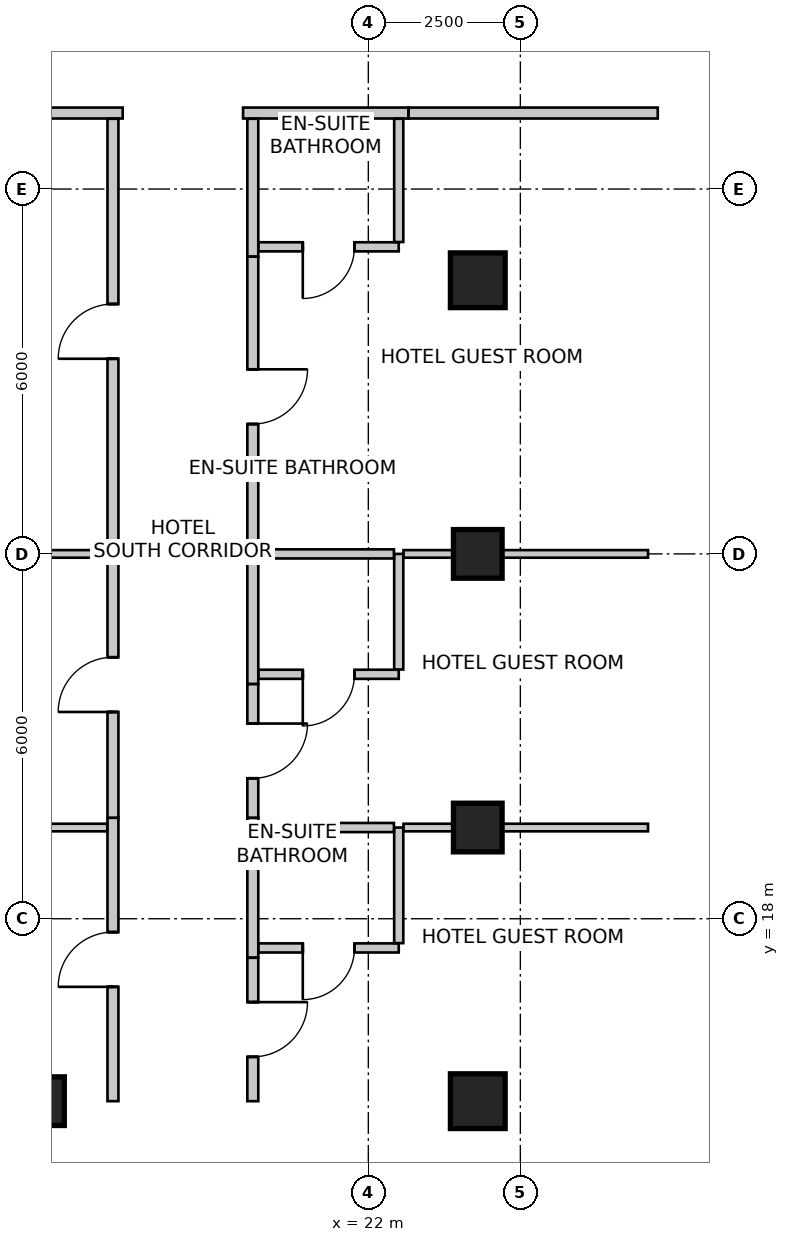
"""IFC4 building model, lengths in metres.
Left out: names, types, materials, properties, quantities, classifications, styles, units other than length and angle.
Written with IfcOpenShell. Run it as: python <this file> out.ifc"""

import sys

from ifc_helpers import new_model, si_unit, direction, frame, frame_2d, origin, origin_2d, place, context, subcontext, project, spatial, rectangle, extrude, source, transform, mapped, element, fill, save


model = new_model("IFC4")
c1 = context("Model", 3, precision=1e-05, world=origin(), true_north=direction((0.0, 1.0)))
c2 = subcontext(c1, "Body", "Model", "MODEL_VIEW")
j1 = project(units=[si_unit("LENGTHUNIT", "METRE"), si_unit("PLANEANGLEUNIT", "RADIAN")], contexts=[c1])
p1 = place(None, origin())
s1 = spatial("IfcSite", under=j1, at=p1, CompositionType="ELEMENT")
p2 = place(p1, origin())
s2 = spatial("IfcBuilding", under=s1, at=p2, CompositionType="ELEMENT")
p3 = place(p2, frame((0.0, 0.0, 125.0)))
s3 = spatial("IfcBuildingStorey", under=s2, at=p3, CompositionType="ELEMENT", Elevation=125.0)
m1 = source(origin(), c2, "Body", "SweptSolid", [
    extrude(rectangle(XDim=0.9, YDim=0.9, at=origin_2d()), origin(), (0.0, 0.0, 1.0), 3.6),
])
p4 = place(p3, frame((23.8, 28.5, 0.0), z_axis=(0.0, 0.0, 1.0), x_axis=(1.0, 0.0, 0.0)))
e1 = element("IfcColumn", 1, at=p4, inside=s3, PredefinedType="COLUMN", context=c2, shape_type="MappedRepresentation", body=[
    mapped(m1, transform((0.0, 0.0, 0.0), scale=1.0)),
])
m2 = source(origin(), c2, "Body", "SweptSolid", [
    extrude(rectangle(XDim=0.8, YDim=0.8, at=origin_2d()), origin(), (0.0, 0.0, 1.0), 3.6),
])
for number, where, z_axis, x_axis in (
    (2, (23.8, 24.0, 0.0), (0.0, 0.0, 1.0), (1.0, 0.0, 0.0)),
    (3, (23.8, 19.5, 0.0), (0.0, 0.0, 1.0), (1.0, 0.0, 0.0)),
):
    element("IfcColumn", number, at=place(p3, frame(where, z_axis=z_axis, x_axis=x_axis)), inside=s3, PredefinedType="COLUMN", context=c2, shape_type="MappedRepresentation", body=[
        mapped(m2, transform((0.0, 0.0, 0.0), scale=1.0)),
    ])
p5 = place(p3, frame((23.8, 15.0, 0.0), z_axis=(0.0, 0.0, 1.0), x_axis=(1.0, 0.0, 0.0)))
e4 = element("IfcColumn", 4, at=p5, inside=s3, PredefinedType="COLUMN", context=c2, shape_type="MappedRepresentation", body=[
    mapped(m1, transform((0.0, 0.0, 0.0), scale=1.0)),
])
p6 = place(p3, frame((16.6, 15.0, 0.0), z_axis=(0.0, 0.0, 1.0), x_axis=(1.0, 0.0, 0.0)))
e5 = element("IfcColumn", 5, at=p6, inside=s3, PredefinedType="COLUMN", context=c2, shape_type="MappedRepresentation", body=[
    mapped(m2, transform((0.0, 0.0, 0.0), scale=1.0)),
])
p7 = place(p3, frame((17.96, 31.25, 0.0), z_axis=(0.0, 0.0, 1.0), x_axis=(-1.0, 0.0, 0.0)))
e6 = element("IfcWall", 6, at=p7, inside=s3, PredefinedType="PARTITIONING", context=c2, shape_type="SweptSolid", body=[
    extrude(rectangle(XDim=5.366, YDim=0.18, at=frame_2d((2.683, 0.0))), origin(), (0.0, 0.0, 1.0), 2.935),
])
p8 = place(p3, frame((22.66, 31.25, 0.0), z_axis=(0.0, 0.0, 1.0), x_axis=(-1.0, 0.0, 0.0)))
e7 = element("IfcWall", 7, at=p8, inside=s3, PredefinedType="PARTITIONING", context=c2, shape_type="SweptSolid", body=[
    extrude(rectangle(XDim=2.72, YDim=0.18, at=frame_2d((1.36, 0.0))), origin(), (0.0, 0.0, 1.0), 2.935),
])
p9 = place(p3, frame((26.76, 31.25, 0.0), z_axis=(0.0, 0.0, 1.0), x_axis=(-1.0, 0.0, 0.0)))
e8 = element("IfcWall", 8, at=p9, inside=s3, PredefinedType="PARTITIONING", context=c2, shape_type="SweptSolid", body=[
    extrude(rectangle(XDim=4.098, YDim=0.18, at=frame_2d((2.049, 0.0))), origin(), (0.0, 0.0, 1.0), 3.35),
])
p10 = place(p3, frame((17.8, 15.0, 0.0), z_axis=(0.0, 0.0, 1.0), x_axis=(0.0, 1.0, 0.0)))
e9 = element("IfcWall", 9, at=p10, inside=s3, PredefinedType="PARTITIONING", context=c2, shape_type="SweptSolid", body=[
    extrude(rectangle(XDim=4.66, YDim=0.18, at=frame_2d((2.33, 0.0))), origin(), (0.0, 0.0, 1.0), 2.492),
])
m3 = source(origin(), c2, "Body", "SweptSolid", [
    extrude(rectangle(XDim=0.9, YDim=2.15, at=frame_2d((0.45, 1.075))), frame((0.0, 0.1, 0.0), z_axis=(0.0, -1.0, 0.0), x_axis=(1.0, 0.0, 0.0)), (0.0, 0.0, 1.0), 0.2),
])
p11 = place(p10, frame((1.88, 0.0, 0.0)))
e10 = element("IfcOpeningElement", 10, at=p11, cuts=e9, PredefinedType="OPENING", context=c2, shape_type="MappedRepresentation", body=[
    mapped(m3, transform((0.0, 0.0, 0.0), scale=1.0)),
])
p12 = place(p3, frame((20.1, 19.66, 0.0), z_axis=(0.0, 0.0, 1.0), x_axis=(0.0, -1.0, 0.0)))
e11 = element("IfcWall", 11, at=p12, inside=s3, PredefinedType="PARTITIONING", context=c2, shape_type="SweptSolid", body=[
    extrude(rectangle(XDim=2.3, YDim=0.18, at=frame_2d((1.15, 0.0))), origin(), (0.0, 0.0, 1.0), 3.35),
])
p13 = place(p3, frame((20.1, 17.358, 0.0), z_axis=(0.0, 0.0, 1.0), x_axis=(0.0, -1.0, 0.0)))
e12 = element("IfcWall", 12, at=p13, inside=s3, PredefinedType="PARTITIONING", context=c2, shape_type="SweptSolid", body=[
    extrude(rectangle(XDim=2.358, YDim=0.18, at=frame_2d((1.179, 0.0))), origin(), (0.0, 0.0, 1.0), 2.492),
])
p14 = place(p13, frame((0.729, 0.0, 0.0)))
e13 = element("IfcOpeningElement", 13, at=p14, cuts=e12, PredefinedType="OPENING", context=c2, shape_type="MappedRepresentation", body=[
    mapped(m3, transform((0.0, 0.0, 0.0), scale=1.0)),
])
p15 = place(p3, frame((17.8, 19.662, 0.0), z_axis=(0.0, 0.0, 1.0), x_axis=(0.0, 1.0, 0.0)))
e14 = element("IfcWall", 14, at=p15, inside=s3, PredefinedType="PARTITIONING", context=c2, shape_type="SweptSolid", body=[
    extrude(rectangle(XDim=4.498, YDim=0.18, at=frame_2d((2.249, 0.0))), origin(), (0.0, 0.0, 1.0), 2.788),
])
p16 = place(p15, frame((1.738, 0.0, 0.0)))
e15 = element("IfcOpeningElement", 15, at=p16, cuts=e14, PredefinedType="OPENING", context=c2, shape_type="MappedRepresentation", body=[
    mapped(m3, transform((0.0, 0.0, 0.0), scale=1.0)),
])
p17 = place(p3, frame((20.1, 24.16, 0.0), z_axis=(0.0, 0.0, 1.0), x_axis=(0.0, -1.0, 0.0)))
e16 = element("IfcWall", 16, at=p17, inside=s3, PredefinedType="PARTITIONING", context=c2, shape_type="SweptSolid", body=[
    extrude(rectangle(XDim=2.3, YDim=0.18, at=frame_2d((1.15, 0.0))), origin(), (0.0, 0.0, 1.0), 2.803),
])
p18 = place(p3, frame((20.1, 21.858, 0.0), z_axis=(0.0, 0.0, 1.0), x_axis=(0.0, -1.0, 0.0)))
e17 = element("IfcWall", 17, at=p18, inside=s3, PredefinedType="PARTITIONING", context=c2, shape_type="SweptSolid", body=[
    extrude(rectangle(XDim=2.196, YDim=0.18, at=frame_2d((1.098, 0.0))), origin(), (0.0, 0.0, 1.0), 2.788),
])
p19 = place(p18, frame((0.648, 0.0, 0.0)))
e18 = element("IfcOpeningElement", 18, at=p19, cuts=e17, PredefinedType="OPENING", context=c2, shape_type="MappedRepresentation", body=[
    mapped(m3, transform((0.0, 0.0, 0.0), scale=1.0)),
])
p20 = place(p3, frame((17.8, 24.162, 0.0), z_axis=(0.0, 0.0, 1.0), x_axis=(0.0, 1.0, 0.0)))
e19 = element("IfcWall", 19, at=p20, inside=s3, PredefinedType="PARTITIONING", context=c2, shape_type="SweptSolid", body=[
    extrude(rectangle(XDim=6.994, YDim=0.18, at=frame_2d((3.497, 0.0))), origin(), (0.0, 0.0, 1.0), 2.788),
])
p21 = place(p20, frame((3.047, 0.0, 0.0)))
e20 = element("IfcOpeningElement", 20, at=p21, cuts=e19, PredefinedType="OPENING", context=c2, shape_type="MappedRepresentation", body=[
    mapped(m3, transform((0.0, 0.0, 0.0), scale=1.0)),
])
p22 = place(p3, frame((20.1, 31.156, 0.0), z_axis=(0.0, 0.0, 1.0), x_axis=(0.0, -1.0, 0.0)))
e21 = element("IfcWall", 21, at=p22, inside=s3, PredefinedType="PARTITIONING", context=c2, shape_type="SweptSolid", body=[
    extrude(rectangle(XDim=2.266, YDim=0.18, at=frame_2d((1.133, 0.0))), origin(), (0.0, 0.0, 1.0), 2.935),
])
p23 = place(p3, frame((20.1, 28.888, 0.0), z_axis=(0.0, 0.0, 1.0), x_axis=(0.0, -1.0, 0.0)))
e22 = element("IfcWall", 22, at=p23, inside=s3, PredefinedType="PARTITIONING", context=c2, shape_type="SweptSolid", body=[
    extrude(rectangle(XDim=4.726, YDim=0.18, at=frame_2d((2.363, 0.0))), origin(), (0.0, 0.0, 1.0), 2.788),
])
p24 = place(p23, frame((1.853, 0.0, 0.0)))
e23 = element("IfcOpeningElement", 23, at=p24, cuts=e22, PredefinedType="OPENING", context=c2, shape_type="MappedRepresentation", body=[
    mapped(m3, transform((0.0, 0.0, 0.0), scale=1.0)),
])
p25 = place(p3, frame((13.164, 19.5, 0.0), z_axis=(0.0, 0.0, 1.0), x_axis=(1.0, 0.0, 0.0)))
e24 = element("IfcWall", 24, at=p25, inside=s3, PredefinedType="PARTITIONING", context=c2, shape_type="SweptSolid", body=[
    extrude(rectangle(XDim=4.542, YDim=0.125, at=frame_2d((2.271, 0.0))), origin(), (0.0, 0.0, 1.0), 3.35),
])
p26 = place(p3, frame((22.5, 17.52, 0.0), z_axis=(0.0, 0.0, 1.0), x_axis=(-1.0, 0.0, 0.0)))
e25 = element("IfcWall", 25, at=p26, inside=s3, PredefinedType="PARTITIONING", context=c2, shape_type="SweptSolid", body=[
    extrude(rectangle(XDim=2.306, YDim=0.15, at=frame_2d((1.153, 0.0))), origin(), (0.0, 0.0, 1.0), 2.788),
])
m4 = source(origin(), c2, "Body", "SweptSolid", [
    extrude(rectangle(XDim=0.85, YDim=2.15, at=frame_2d((0.425, 1.075))), frame((0.0, 0.085, 0.0), z_axis=(0.0, -1.0, 0.0), x_axis=(1.0, 0.0, 0.0)), (0.0, 0.0, 1.0), 0.17),
])
p27 = place(p26, frame((0.728, 0.0, 0.0)))
e26 = element("IfcOpeningElement", 26, at=p27, cuts=e25, PredefinedType="OPENING", context=c2, shape_type="MappedRepresentation", body=[
    mapped(m4, transform((0.0, 0.0, 0.0), scale=1.0)),
])
p28 = place(p3, frame((22.5, 19.5, 0.0), z_axis=(0.0, 0.0, 1.0), x_axis=(0.0, -1.0, 0.0)))
e27 = element("IfcWall", 27, at=p28, inside=s3, PredefinedType="PARTITIONING", context=c2, shape_type="SweptSolid", body=[
    extrude(rectangle(XDim=1.901, YDim=0.15, at=frame_2d((0.95, 0.0))), origin(), (0.0, 0.0, 1.0), 2.788),
])
p29 = place(p3, frame((20.194, 19.5, 0.0), z_axis=(0.0, 0.0, 1.0), x_axis=(1.0, 0.0, 0.0)))
e28 = element("IfcWall", 28, at=p29, inside=s3, PredefinedType="PARTITIONING", context=c2, shape_type="SweptSolid", body=[
    extrude(rectangle(XDim=2.227, YDim=0.15, at=frame_2d((1.113, 0.0))), origin(), (0.0, 0.0, 1.0), 3.35),
])
p30 = place(p3, frame((22.579, 19.5, 0.0), z_axis=(0.0, 0.0, 1.0), x_axis=(1.0, 0.0, 0.0)))
e29 = element("IfcWall", 29, at=p30, inside=s3, PredefinedType="PARTITIONING", context=c2, shape_type="SweptSolid", body=[
    extrude(rectangle(XDim=4.021, YDim=0.125, at=frame_2d((2.01, 0.0))), origin(), (0.0, 0.0, 1.0), 2.492),
])
p31 = place(p3, frame((12.295, 24.0, 0.0), z_axis=(0.0, 0.0, 1.0), x_axis=(1.0, 0.0, 0.0)))
e30 = element("IfcWall", 30, at=p31, inside=s3, PredefinedType="PARTITIONING", context=c2, shape_type="SweptSolid", body=[
    extrude(rectangle(XDim=5.411, YDim=0.125, at=frame_2d((2.706, 0.0))), origin(), (0.0, 0.0, 1.0), 2.803),
])
p32 = place(p3, frame((22.5, 22.02, 0.0), z_axis=(0.0, 0.0, 1.0), x_axis=(-1.0, 0.0, 0.0)))
e31 = element("IfcWall", 31, at=p32, inside=s3, PredefinedType="PARTITIONING", context=c2, shape_type="SweptSolid", body=[
    extrude(rectangle(XDim=2.306, YDim=0.15, at=frame_2d((1.153, 0.0))), origin(), (0.0, 0.0, 1.0), 3.35),
])
p33 = place(p32, frame((0.728, 0.0, 0.0)))
e32 = element("IfcOpeningElement", 32, at=p33, cuts=e31, PredefinedType="OPENING", context=c2, shape_type="MappedRepresentation", body=[
    mapped(m4, transform((0.0, 0.0, 0.0), scale=1.0)),
])
p34 = place(p3, frame((22.5, 24.0, 0.0), z_axis=(0.0, 0.0, 1.0), x_axis=(0.0, -1.0, 0.0)))
e33 = element("IfcWall", 33, at=p34, inside=s3, PredefinedType="PARTITIONING", context=c2, shape_type="SweptSolid", body=[
    extrude(rectangle(XDim=1.901, YDim=0.15, at=frame_2d((0.95, 0.0))), origin(), (0.0, 0.0, 1.0), 2.803),
])
p35 = place(p3, frame((20.194, 24.0, 0.0), z_axis=(0.0, 0.0, 1.0), x_axis=(1.0, 0.0, 0.0)))
e34 = element("IfcWall", 34, at=p35, inside=s3, PredefinedType="PARTITIONING", context=c2, shape_type="SweptSolid", body=[
    extrude(rectangle(XDim=2.227, YDim=0.15, at=frame_2d((1.113, 0.0))), origin(), (0.0, 0.0, 1.0), 2.803),
])
p36 = place(p3, frame((22.579, 24.0, 0.0), z_axis=(0.0, 0.0, 1.0), x_axis=(1.0, 0.0, 0.0)))
e35 = element("IfcWall", 35, at=p36, inside=s3, PredefinedType="PARTITIONING", context=c2, shape_type="SweptSolid", body=[
    extrude(rectangle(XDim=4.021, YDim=0.125, at=frame_2d((2.01, 0.0))), origin(), (0.0, 0.0, 1.0), 2.492),
])
p37 = place(p3, frame((22.5, 29.05, 0.0), z_axis=(0.0, 0.0, 1.0), x_axis=(-1.0, 0.0, 0.0)))
e36 = element("IfcWall", 36, at=p37, inside=s3, PredefinedType="PARTITIONING", context=c2, shape_type="SweptSolid", body=[
    extrude(rectangle(XDim=2.306, YDim=0.15, at=frame_2d((1.153, 0.0))), origin(), (0.0, 0.0, 1.0), 2.935),
])
p38 = place(p37, frame((0.728, 0.0, 0.0)))
e37 = element("IfcOpeningElement", 37, at=p38, cuts=e36, PredefinedType="OPENING", context=c2, shape_type="MappedRepresentation", body=[
    mapped(m4, transform((0.0, 0.0, 0.0), scale=1.0)),
])
p39 = place(p3, frame((22.5, 31.156, 0.0), z_axis=(0.0, 0.0, 1.0), x_axis=(0.0, -1.0, 0.0)))
e38 = element("IfcWall", 38, at=p39, inside=s3, PredefinedType="PARTITIONING", context=c2, shape_type="SweptSolid", body=[
    extrude(rectangle(XDim=2.027, YDim=0.15, at=frame_2d((1.014, 0.0))), origin(), (0.0, 0.0, 1.0), 2.935),
])
m5 = source(origin(), c2, "Body", "SweptSolid", [
    extrude(rectangle(XDim=0.9, YDim=2.15, at=frame_2d((0.45, 1.075))), frame((0.0, 0.025, 0.0), z_axis=(0.0, -1.0, 0.0), x_axis=(1.0, 0.0, 0.0)), (0.0, 0.0, 1.0), 0.05),
])
p40 = place(p11, origin())
e39 = element("IfcDoor", 39, at=p40, inside=s3, OperationType="SINGLE_SWING_LEFT", PredefinedType="DOOR", context=c2, shape_type="MappedRepresentation", body=[
    mapped(m5, transform((0.0, 0.0, 0.0), scale=1.0)),
])
fill(e10, e39)
m6 = source(origin(), c2, "Body", "SweptSolid", [
    extrude(rectangle(XDim=0.85, YDim=2.15, at=frame_2d((0.425, 1.075))), frame((0.0, 0.025, 0.0), z_axis=(0.0, -1.0, 0.0), x_axis=(1.0, 0.0, 0.0)), (0.0, 0.0, 1.0), 0.05),
])
p41 = place(p27, origin())
e40 = element("IfcDoor", 40, at=p41, inside=s3, OperationType="SINGLE_SWING_RIGHT", PredefinedType="DOOR", context=c2, shape_type="MappedRepresentation", body=[
    mapped(m6, transform((0.0, 0.0, 0.0), scale=1.0)),
])
fill(e26, e40)
p42 = place(p14, origin())
e41 = element("IfcDoor", 41, at=p42, inside=s3, OperationType="SINGLE_SWING_LEFT", PredefinedType="DOOR", context=c2, shape_type="MappedRepresentation", body=[
    mapped(m5, transform((0.0, 0.0, 0.0), scale=1.0)),
])
fill(e13, e41)
p43 = place(p16, origin())
e42 = element("IfcDoor", 42, at=p43, inside=s3, OperationType="SINGLE_SWING_LEFT", PredefinedType="DOOR", context=c2, shape_type="MappedRepresentation", body=[
    mapped(m5, transform((0.0, 0.0, 0.0), scale=1.0)),
])
fill(e15, e42)
p44 = place(p33, origin())
e43 = element("IfcDoor", 43, at=p44, inside=s3, OperationType="SINGLE_SWING_RIGHT", PredefinedType="DOOR", context=c2, shape_type="MappedRepresentation", body=[
    mapped(m6, transform((0.0, 0.0, 0.0), scale=1.0)),
])
fill(e32, e43)
p45 = place(p19, origin())
e44 = element("IfcDoor", 44, at=p45, inside=s3, OperationType="SINGLE_SWING_LEFT", PredefinedType="DOOR", context=c2, shape_type="MappedRepresentation", body=[
    mapped(m5, transform((0.0, 0.0, 0.0), scale=1.0)),
])
fill(e18, e44)
p46 = place(p21, origin())
e45 = element("IfcDoor", 45, at=p46, inside=s3, OperationType="SINGLE_SWING_LEFT", PredefinedType="DOOR", context=c2, shape_type="MappedRepresentation", body=[
    mapped(m5, transform((0.0, 0.0, 0.0), scale=1.0)),
])
fill(e20, e45)
p47 = place(p38, origin())
e46 = element("IfcDoor", 46, at=p47, inside=s3, OperationType="SINGLE_SWING_RIGHT", PredefinedType="DOOR", context=c2, shape_type="MappedRepresentation", body=[
    mapped(m6, transform((0.0, 0.0, 0.0), scale=1.0)),
])
fill(e37, e46)
p48 = place(p24, origin())
e47 = element("IfcDoor", 47, at=p48, inside=s3, OperationType="SINGLE_SWING_LEFT", PredefinedType="DOOR", context=c2, shape_type="MappedRepresentation", body=[
    mapped(m5, transform((0.0, 0.0, 0.0), scale=1.0)),
])
fill(e23, e47)
save(model, sys.argv[1])
